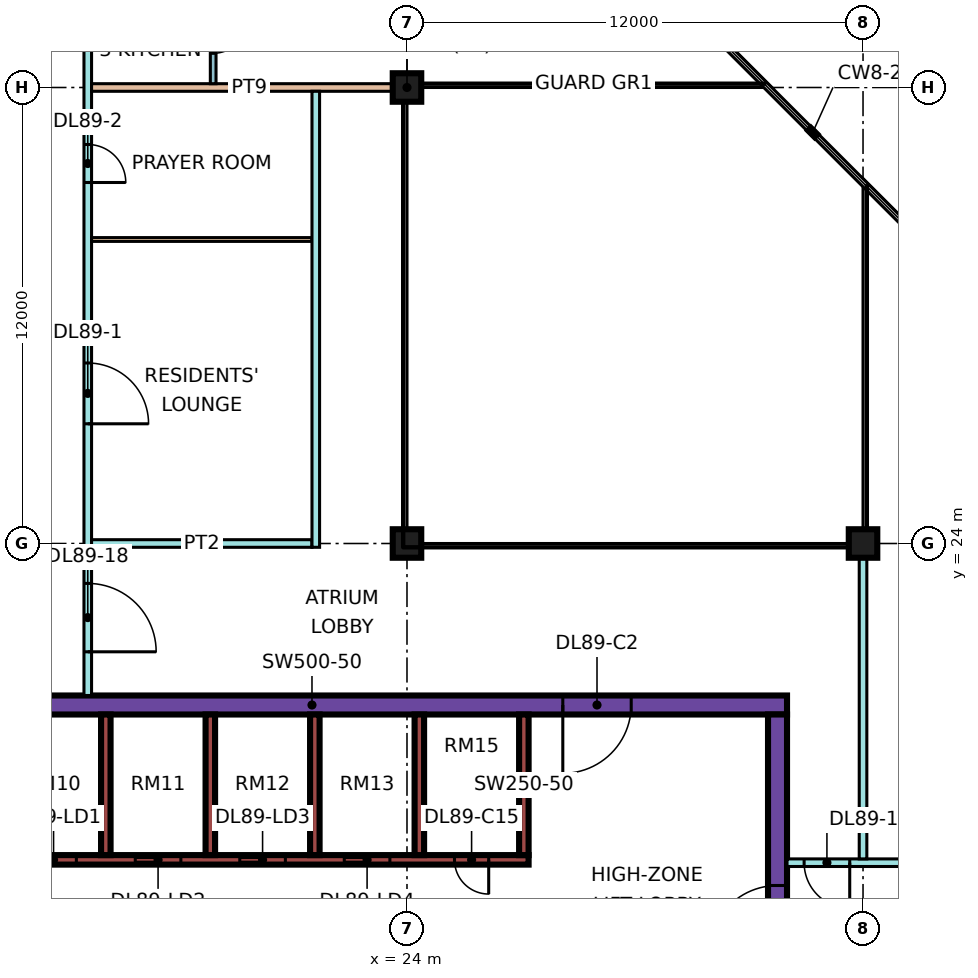
"""IFC4 building model, lengths in metres.
Left out: names, types, materials, properties, quantities, classifications, styles, units other than length and angle.
Written with IfcOpenShell. Run it as: python <this file> out.ifc"""

import sys

from ifc_helpers import new_model, si_unit, direction, frame, frame_2d, origin, origin_2d, place, context, subcontext, project, spatial, rectangle, extrude, element, fill, save


model = new_model("IFC4")
c1 = context("Model", 3, precision=1e-05, world=origin(), true_north=direction((0.0, 1.0)))
c2 = subcontext(c1, "Body", "Model", "MODEL_VIEW")
j1 = project(units=[si_unit("LENGTHUNIT", "METRE"), si_unit("PLANEANGLEUNIT", "RADIAN")], contexts=[c1])
p1 = place(None, origin())
s1 = spatial("IfcSite", under=j1, at=p1, CompositionType="ELEMENT")
p2 = place(p1, origin())
s2 = spatial("IfcBuilding", under=s1, at=p2, CompositionType="ELEMENT")
p3 = place(p2, frame((0.0, 0.0, 380.15)))
s3 = spatial("IfcBuildingStorey", under=s2, at=p3, CompositionType="ELEMENT", Elevation=380.15)
for number, where, z_axis, x_axis in (
    (1, (24.0, 24.0, 0.0), (0.0, 0.0, 1.0), (1.0, 0.0, 0.0)),
    (2, (24.0, 36.0, 0.0), (0.0, 0.0, 1.0), (1.0, 0.0, 0.0)),
    (3, (36.0, 24.0, 0.0), (0.0, 0.0, 1.0), (1.0, 0.0, 0.0)),
):
    element("IfcColumn", number, at=place(p3, frame(where, z_axis=z_axis, x_axis=x_axis)), inside=s3, PredefinedType="COLUMN", context=c2, shape_type="SweptSolid", body=[
        extrude(rectangle(XDim=0.75, YDim=0.75, at=origin_2d()), origin(), (0.0, 0.0, 1.0), 3.75),
    ])
p4 = place(p3, frame((9.0, 19.75, 0.0), z_axis=(0.0, 0.0, 1.0), x_axis=(1.0, 0.0, 0.0)))
e4 = element("IfcWall", 4, at=p4, inside=s3, PredefinedType="SHEAR", context=c2, shape_type="SweptSolid", body=[
    extrude(rectangle(XDim=25.0, YDim=0.5, at=frame_2d((12.5, 0.0))), origin(), (0.0, 0.0, 1.0), 3.75),
])
p5 = place(p4, frame((19.1, 0.0, 0.0)))
e5 = element("IfcOpeningElement", 5, at=p5, cuts=e4, PredefinedType="OPENING", context=c2, shape_type="SweptSolid", body=[
    extrude(rectangle(XDim=1.8, YDim=2.4, at=frame_2d((0.9, 1.2))), frame((0.0, 0.26, 0.0), z_axis=(0.0, -1.0, 0.0), x_axis=(1.0, 0.0, 0.0)), (0.0, 0.0, 1.0), 0.52),
])
p6 = place(p3, frame((33.75, 7.5, 0.0), z_axis=(0.0, 0.0, 1.0), x_axis=(0.0, 1.0, 0.0)))
e6 = element("IfcWall", 6, at=p6, inside=s3, PredefinedType="SHEAR", context=c2, shape_type="SweptSolid", body=[
    extrude(rectangle(XDim=12.0, YDim=0.5, at=frame_2d((6.0, 0.0))), origin(), (0.0, 0.0, 1.0), 3.75),
])
p7 = place(p6, frame((5.7, 0.0, 0.0)))
e7 = element("IfcOpeningElement", 7, at=p7, cuts=e6, PredefinedType="OPENING", context=c2, shape_type="SweptSolid", body=[
    extrude(rectangle(XDim=1.8, YDim=2.4, at=frame_2d((0.9, 1.2))), frame((0.0, 0.26, 0.0), z_axis=(0.0, -1.0, 0.0), x_axis=(1.0, 0.0, 0.0)), (0.0, 0.0, 1.0), 0.52),
])
p8 = place(p3, frame((13.45, 15.675, 0.0), z_axis=(0.0, 0.0, 1.0), x_axis=(1.0, 0.0, 0.0)))
e8 = element("IfcWall", 8, at=p8, inside=s3, PredefinedType="SHEAR", context=c2, shape_type="SweptSolid", body=[
    extrude(rectangle(XDim=13.75, YDim=0.25, at=frame_2d((6.875, 0.0))), origin(), (0.0, 0.0, 1.0), 3.75),
])
p9 = place(p8, frame((0.65, 0.0, 0.0)))
e9 = element("IfcOpeningElement", 9, at=p9, cuts=e8, PredefinedType="OPENING", context=c2, shape_type="SweptSolid", body=[
    extrude(rectangle(XDim=1.2, YDim=2.2, at=frame_2d((0.6, 1.1))), frame((0.0, 0.135, 0.0), z_axis=(0.0, -1.0, 0.0), x_axis=(1.0, 0.0, 0.0)), (0.0, 0.0, 1.0), 0.27),
])
p10 = place(p8, frame((3.4, 0.0, 0.0)))
e10 = element("IfcOpeningElement", 10, at=p10, cuts=e8, PredefinedType="OPENING", context=c2, shape_type="SweptSolid", body=[
    extrude(rectangle(XDim=1.2, YDim=2.2, at=frame_2d((0.6, 1.1))), frame((0.0, 0.135, 0.0), z_axis=(0.0, -1.0, 0.0), x_axis=(1.0, 0.0, 0.0)), (0.0, 0.0, 1.0), 0.27),
])
p11 = place(p8, frame((6.15, 0.0, 0.0)))
e11 = element("IfcOpeningElement", 11, at=p11, cuts=e8, PredefinedType="OPENING", context=c2, shape_type="SweptSolid", body=[
    extrude(rectangle(XDim=1.2, YDim=2.2, at=frame_2d((0.6, 1.1))), frame((0.0, 0.135, 0.0), z_axis=(0.0, -1.0, 0.0), x_axis=(1.0, 0.0, 0.0)), (0.0, 0.0, 1.0), 0.27),
])
p12 = place(p8, frame((8.9, 0.0, 0.0)))
e12 = element("IfcOpeningElement", 12, at=p12, cuts=e8, PredefinedType="OPENING", context=c2, shape_type="SweptSolid", body=[
    extrude(rectangle(XDim=1.2, YDim=2.2, at=frame_2d((0.6, 1.1))), frame((0.0, 0.135, 0.0), z_axis=(0.0, -1.0, 0.0), x_axis=(1.0, 0.0, 0.0)), (0.0, 0.0, 1.0), 0.27),
])
p13 = place(p8, frame((11.8, 0.0, 0.0)))
e13 = element("IfcOpeningElement", 13, at=p13, cuts=e8, PredefinedType="OPENING", context=c2, shape_type="SweptSolid", body=[
    extrude(rectangle(XDim=0.9, YDim=2.1, at=frame_2d((0.45, 1.05))), frame((0.0, 0.135, 0.0), z_axis=(0.0, -1.0, 0.0), x_axis=(1.0, 0.0, 0.0)), (0.0, 0.0, 1.0), 0.27),
])
for number, where, z_axis, x_axis in (
    (14, (16.075, 15.8, 0.0), (0.0, 0.0, 1.0), (0.0, 1.0, 0.0)),
    (15, (18.825, 15.8, 0.0), (0.0, 0.0, 1.0), (0.0, 1.0, 0.0)),
    (16, (21.575, 15.8, 0.0), (0.0, 0.0, 1.0), (0.0, 1.0, 0.0)),
    (17, (24.325, 15.8, 0.0), (0.0, 0.0, 1.0), (0.0, 1.0, 0.0)),
    (18, (27.075, 15.8, 0.0), (0.0, 0.0, 1.0), (0.0, 1.0, 0.0)),
):
    element("IfcWall", number, at=place(p3, frame(where, z_axis=z_axis, x_axis=x_axis)), inside=s3, PredefinedType="SHEAR", context=c2, shape_type="SweptSolid", body=[
        extrude(rectangle(XDim=3.7, YDim=0.25, at=frame_2d((1.85, 0.0))), origin(), (0.0, 0.0, 1.0), 3.75),
    ])
p14 = place(p3, frame((15.6, 20.0, 0.0), z_axis=(0.0, 0.0, 1.0), x_axis=(0.0, 1.0, 0.0)))
e19 = element("IfcWall", 19, at=p14, inside=s3, PredefinedType="PARTITIONING", context=c2, shape_type="SweptSolid", body=[
    extrude(rectangle(XDim=27.775, YDim=0.2, at=frame_2d((13.887, 0.0))), origin(), (0.0, 0.0, 1.0), 3.3),
])
p15 = place(p14, frame((7.15, 0.0, 0.0)))
e20 = element("IfcOpeningElement", 20, at=p15, cuts=e19, PredefinedType="OPENING", context=c2, shape_type="SweptSolid", body=[
    extrude(rectangle(XDim=1.6, YDim=2.1, at=frame_2d((0.8, 1.05))), frame((0.0, 0.11, 0.0), z_axis=(0.0, -1.0, 0.0), x_axis=(1.0, 0.0, 0.0)), (0.0, 0.0, 1.0), 0.22),
])
p16 = place(p14, frame((13.5, 0.0, 0.0)))
e21 = element("IfcOpeningElement", 21, at=p16, cuts=e19, PredefinedType="OPENING", context=c2, shape_type="SweptSolid", body=[
    extrude(rectangle(XDim=1.0, YDim=2.1, at=frame_2d((0.5, 1.05))), frame((0.0, 0.11, 0.0), z_axis=(0.0, -1.0, 0.0), x_axis=(1.0, 0.0, 0.0)), (0.0, 0.0, 1.0), 0.22),
])
p17 = place(p14, frame((22.9, 0.0, 0.0)))
e22 = element("IfcOpeningElement", 22, at=p17, cuts=e19, PredefinedType="OPENING", context=c2, shape_type="SweptSolid", body=[
    extrude(rectangle(XDim=1.0, YDim=2.1, at=frame_2d((0.5, 1.05))), frame((0.0, 0.11, 0.0), z_axis=(0.0, -1.0, 0.0), x_axis=(1.0, 0.0, 0.0)), (0.0, 0.0, 1.0), 0.22),
])
p18 = place(p14, frame((1.15, 0.0, 0.0)))
e23 = element("IfcOpeningElement", 23, at=p18, cuts=e19, PredefinedType="OPENING", context=c2, shape_type="SweptSolid", body=[
    extrude(rectangle(XDim=1.8, YDim=2.1, at=frame_2d((0.9, 1.05))), frame((0.0, 0.11, 0.0), z_axis=(0.0, -1.0, 0.0), x_axis=(1.0, 0.0, 0.0)), (0.0, 0.0, 1.0), 0.22),
])
p19 = place(p14, frame((25.9, 0.0, 0.0)))
e24 = element("IfcOpeningElement", 24, at=p19, cuts=e19, PredefinedType="OPENING", context=c2, shape_type="SweptSolid", body=[
    extrude(rectangle(XDim=1.0, YDim=2.1, at=frame_2d((0.5, 1.05))), frame((0.0, 0.11, 0.0), z_axis=(0.0, -1.0, 0.0), x_axis=(1.0, 0.0, 0.0)), (0.0, 0.0, 1.0), 0.22),
])
p20 = place(p3, frame((15.7, 24.0, 0.0), z_axis=(0.0, 0.0, 1.0), x_axis=(1.0, 0.0, 0.0)))
e25 = element("IfcWall", 25, at=p20, inside=s3, PredefinedType="PARTITIONING", context=c2, shape_type="SweptSolid", body=[
    extrude(rectangle(XDim=5.8, YDim=0.2, at=frame_2d((2.9, 0.0))), origin(), (0.0, 0.0, 1.0), 3.3),
])
p21 = place(p3, frame((15.7, 32.0, 0.0), z_axis=(0.0, 0.0, 1.0), x_axis=(1.0, 0.0, 0.0)))
e26 = element("IfcWall", 26, at=p21, inside=s3, PredefinedType="PARTITIONING", context=c2, shape_type="SweptSolid", body=[
    extrude(rectangle(XDim=5.8, YDim=0.1, at=frame_2d((2.9, 0.0))), origin(), (0.0, 0.0, 1.0), 3.3),
])
p22 = place(p3, frame((15.7, 36.0, 0.0), z_axis=(0.0, 0.0, 1.0), x_axis=(1.0, 0.0, 0.0)))
e27 = element("IfcWall", 27, at=p22, inside=s3, PredefinedType="PARTITIONING", context=c2, shape_type="SweptSolid", body=[
    extrude(rectangle(XDim=8.3, YDim=0.2, at=frame_2d((4.15, 0.0))), origin(), (0.0, 0.0, 1.0), 3.3),
])
p23 = place(p3, frame((18.9, 36.1, 0.0), z_axis=(0.0, 0.0, 1.0), x_axis=(0.0, 1.0, 0.0)))
e28 = element("IfcWall", 28, at=p23, inside=s3, PredefinedType="PARTITIONING", context=c2, shape_type="SweptSolid", body=[
    extrude(rectangle(XDim=5.675, YDim=0.15, at=frame_2d((2.837, 0.0))), origin(), (0.0, 0.0, 1.0), 3.3),
])
p24 = place(p23, frame((0.8, 0.0, 0.0)))
e29 = element("IfcOpeningElement", 29, at=p24, cuts=e28, PredefinedType="OPENING", context=c2, shape_type="SweptSolid", body=[
    extrude(rectangle(XDim=0.9, YDim=2.1, at=frame_2d((0.45, 1.05))), frame((0.0, 0.085, 0.0), z_axis=(0.0, -1.0, 0.0), x_axis=(1.0, 0.0, 0.0)), (0.0, 0.0, 1.0), 0.17),
])
p25 = place(p3, frame((21.6, 23.9, 0.0), z_axis=(0.0, 0.0, 1.0), x_axis=(0.0, 1.0, 0.0)))
e30 = element("IfcWall", 30, at=p25, inside=s3, PredefinedType="PARTITIONING", context=c2, shape_type="SweptSolid", body=[
    extrude(rectangle(XDim=12.0, YDim=0.2, at=frame_2d((6.0, 0.0))), origin(), (0.0, 0.0, 1.0), 3.3),
])
p26 = place(p3, frame((34.0, 15.6, 0.0), z_axis=(0.0, 0.0, 1.0), x_axis=(1.0, 0.0, 0.0)))
e31 = element("IfcWall", 31, at=p26, inside=s3, PredefinedType="PARTITIONING", context=c2, shape_type="SweptSolid", body=[
    extrude(rectangle(XDim=10.35, YDim=0.2, at=frame_2d((5.175, 0.0))), origin(), (0.0, 0.0, 1.0), 3.3),
])
p27 = place(p26, frame((5.6, 0.0, 0.0)))
e32 = element("IfcOpeningElement", 32, at=p27, cuts=e31, PredefinedType="OPENING", context=c2, shape_type="SweptSolid", body=[
    extrude(rectangle(XDim=1.0, YDim=2.1, at=frame_2d((0.5, 1.05))), frame((0.0, 0.11, 0.0), z_axis=(0.0, -1.0, 0.0), x_axis=(1.0, 0.0, 0.0)), (0.0, 0.0, 1.0), 0.22),
])
p28 = place(p26, frame((0.45, 0.0, 0.0)))
e33 = element("IfcOpeningElement", 33, at=p28, cuts=e31, PredefinedType="OPENING", context=c2, shape_type="SweptSolid", body=[
    extrude(rectangle(XDim=1.2, YDim=2.1, at=frame_2d((0.6, 1.05))), frame((0.0, 0.11, 0.0), z_axis=(0.0, -1.0, 0.0), x_axis=(1.0, 0.0, 0.0)), (0.0, 0.0, 1.0), 0.22),
])
p29 = place(p3, frame((36.0, 15.7, 0.0), z_axis=(0.0, 0.0, 1.0), x_axis=(0.0, 1.0, 0.0)))
e34 = element("IfcWall", 34, at=p29, inside=s3, PredefinedType="PARTITIONING", context=c2, shape_type="SweptSolid", body=[
    extrude(rectangle(XDim=8.3, YDim=0.2, at=frame_2d((4.15, 0.0))), origin(), (0.0, 0.0, 1.0), 3.3),
])
p30 = place(p9, origin())
e35 = element("IfcDoor", 35, at=p30, inside=s3, OperationType="DOUBLE_DOOR_SLIDING", PredefinedType="DOOR", context=c2, shape_type="SweptSolid", body=[
    extrude(rectangle(XDim=1.2, YDim=2.2, at=frame_2d((0.6, 1.1))), frame((0.0, 0.025, 0.0), z_axis=(0.0, -1.0, 0.0), x_axis=(1.0, 0.0, 0.0)), (0.0, 0.0, 1.0), 0.05),
])
fill(e9, e35)
p31 = place(p10, origin())
e36 = element("IfcDoor", 36, at=p31, inside=s3, OperationType="DOUBLE_DOOR_SLIDING", PredefinedType="DOOR", context=c2, shape_type="SweptSolid", body=[
    extrude(rectangle(XDim=1.2, YDim=2.2, at=frame_2d((0.6, 1.1))), frame((0.0, 0.025, 0.0), z_axis=(0.0, -1.0, 0.0), x_axis=(1.0, 0.0, 0.0)), (0.0, 0.0, 1.0), 0.05),
])
fill(e10, e36)
p32 = place(p11, origin())
e37 = element("IfcDoor", 37, at=p32, inside=s3, OperationType="DOUBLE_DOOR_SLIDING", PredefinedType="DOOR", context=c2, shape_type="SweptSolid", body=[
    extrude(rectangle(XDim=1.2, YDim=2.2, at=frame_2d((0.6, 1.1))), frame((0.0, 0.025, 0.0), z_axis=(0.0, -1.0, 0.0), x_axis=(1.0, 0.0, 0.0)), (0.0, 0.0, 1.0), 0.05),
])
fill(e11, e37)
p33 = place(p12, origin())
e38 = element("IfcDoor", 38, at=p33, inside=s3, OperationType="DOUBLE_DOOR_SLIDING", PredefinedType="DOOR", context=c2, shape_type="SweptSolid", body=[
    extrude(rectangle(XDim=1.2, YDim=2.2, at=frame_2d((0.6, 1.1))), frame((0.0, 0.025, 0.0), z_axis=(0.0, -1.0, 0.0), x_axis=(1.0, 0.0, 0.0)), (0.0, 0.0, 1.0), 0.05),
])
fill(e12, e38)
p34 = place(p7, origin())
e39 = element("IfcDoor", 39, at=p34, inside=s3, OperationType="DOUBLE_DOOR_SINGLE_SWING", PredefinedType="DOOR", context=c2, shape_type="SweptSolid", body=[
    extrude(rectangle(XDim=1.8, YDim=2.4, at=frame_2d((0.9, 1.2))), frame((0.0, 0.025, 0.0), z_axis=(0.0, -1.0, 0.0), x_axis=(1.0, 0.0, 0.0)), (0.0, 0.0, 1.0), 0.05),
])
fill(e7, e39)
p35 = place(p5, frame((1.8, 0.0, 0.0), z_axis=(0.0, 0.0, 1.0), x_axis=(-1.0, 0.0, 0.0)))
e40 = element("IfcDoor", 40, at=p35, inside=s3, OperationType="DOUBLE_DOOR_SINGLE_SWING", PredefinedType="DOOR", context=c2, shape_type="SweptSolid", body=[
    extrude(rectangle(XDim=1.8, YDim=2.4, at=frame_2d((0.9, 1.2))), frame((0.0, 0.025, 0.0), z_axis=(0.0, -1.0, 0.0), x_axis=(1.0, 0.0, 0.0)), (0.0, 0.0, 1.0), 0.05),
])
fill(e5, e40)
p36 = place(p13, origin())
e41 = element("IfcDoor", 41, at=p36, inside=s3, OperationType="SINGLE_SWING_RIGHT", PredefinedType="DOOR", context=c2, shape_type="SweptSolid", body=[
    extrude(rectangle(XDim=0.9, YDim=2.1, at=frame_2d((0.45, 1.05))), frame((0.0, 0.025, 0.0), z_axis=(0.0, -1.0, 0.0), x_axis=(1.0, 0.0, 0.0)), (0.0, 0.0, 1.0), 0.05),
])
fill(e13, e41)
p37 = place(p15, frame((1.6, 0.0, 0.0), z_axis=(0.0, 0.0, 1.0), x_axis=(-1.0, 0.0, 0.0)))
e42 = element("IfcDoor", 42, at=p37, inside=s3, OperationType="DOUBLE_DOOR_SINGLE_SWING", PredefinedType="DOOR", context=c2, shape_type="SweptSolid", body=[
    extrude(rectangle(XDim=1.6, YDim=2.1, at=frame_2d((0.8, 1.05))), frame((0.0, 0.025, 0.0), z_axis=(0.0, -1.0, 0.0), x_axis=(1.0, 0.0, 0.0)), (0.0, 0.0, 1.0), 0.05),
])
fill(e20, e42)
p38 = place(p16, frame((1.0, 0.0, 0.0), z_axis=(0.0, 0.0, 1.0), x_axis=(-1.0, 0.0, 0.0)))
e43 = element("IfcDoor", 43, at=p38, inside=s3, OperationType="SINGLE_SWING_LEFT", PredefinedType="DOOR", context=c2, shape_type="SweptSolid", body=[
    extrude(rectangle(XDim=1.0, YDim=2.1, at=frame_2d((0.5, 1.05))), frame((0.0, 0.025, 0.0), z_axis=(0.0, -1.0, 0.0), x_axis=(1.0, 0.0, 0.0)), (0.0, 0.0, 1.0), 0.05),
])
fill(e21, e43)
p39 = place(p24, origin())
e44 = element("IfcDoor", 44, at=p39, inside=s3, OperationType="SINGLE_SWING_RIGHT", PredefinedType="DOOR", context=c2, shape_type="SweptSolid", body=[
    extrude(rectangle(XDim=0.9, YDim=2.1, at=frame_2d((0.45, 1.05))), frame((0.0, 0.025, 0.0), z_axis=(0.0, -1.0, 0.0), x_axis=(1.0, 0.0, 0.0)), (0.0, 0.0, 1.0), 0.05),
])
fill(e29, e44)
p40 = place(p28, origin())
e45 = element("IfcDoor", 45, at=p40, inside=s3, OperationType="SINGLE_SWING_RIGHT", PredefinedType="DOOR", context=c2, shape_type="SweptSolid", body=[
    extrude(rectangle(XDim=1.2, YDim=2.1, at=frame_2d((0.6, 1.05))), frame((0.0, 0.025, 0.0), z_axis=(0.0, -1.0, 0.0), x_axis=(1.0, 0.0, 0.0)), (0.0, 0.0, 1.0), 0.05),
])
fill(e33, e45)
p41 = place(p18, frame((1.8, 0.0, 0.0), z_axis=(0.0, 0.0, 1.0), x_axis=(-1.0, 0.0, 0.0)))
e46 = element("IfcDoor", 46, at=p41, inside=s3, OperationType="DOUBLE_DOOR_SINGLE_SWING", PredefinedType="DOOR", context=c2, shape_type="SweptSolid", body=[
    extrude(rectangle(XDim=1.8, YDim=2.1, at=frame_2d((0.9, 1.05))), frame((0.0, 0.025, 0.0), z_axis=(0.0, -1.0, 0.0), x_axis=(1.0, 0.0, 0.0)), (0.0, 0.0, 1.0), 0.05),
])
fill(e23, e46)
save(model, sys.argv[1])
